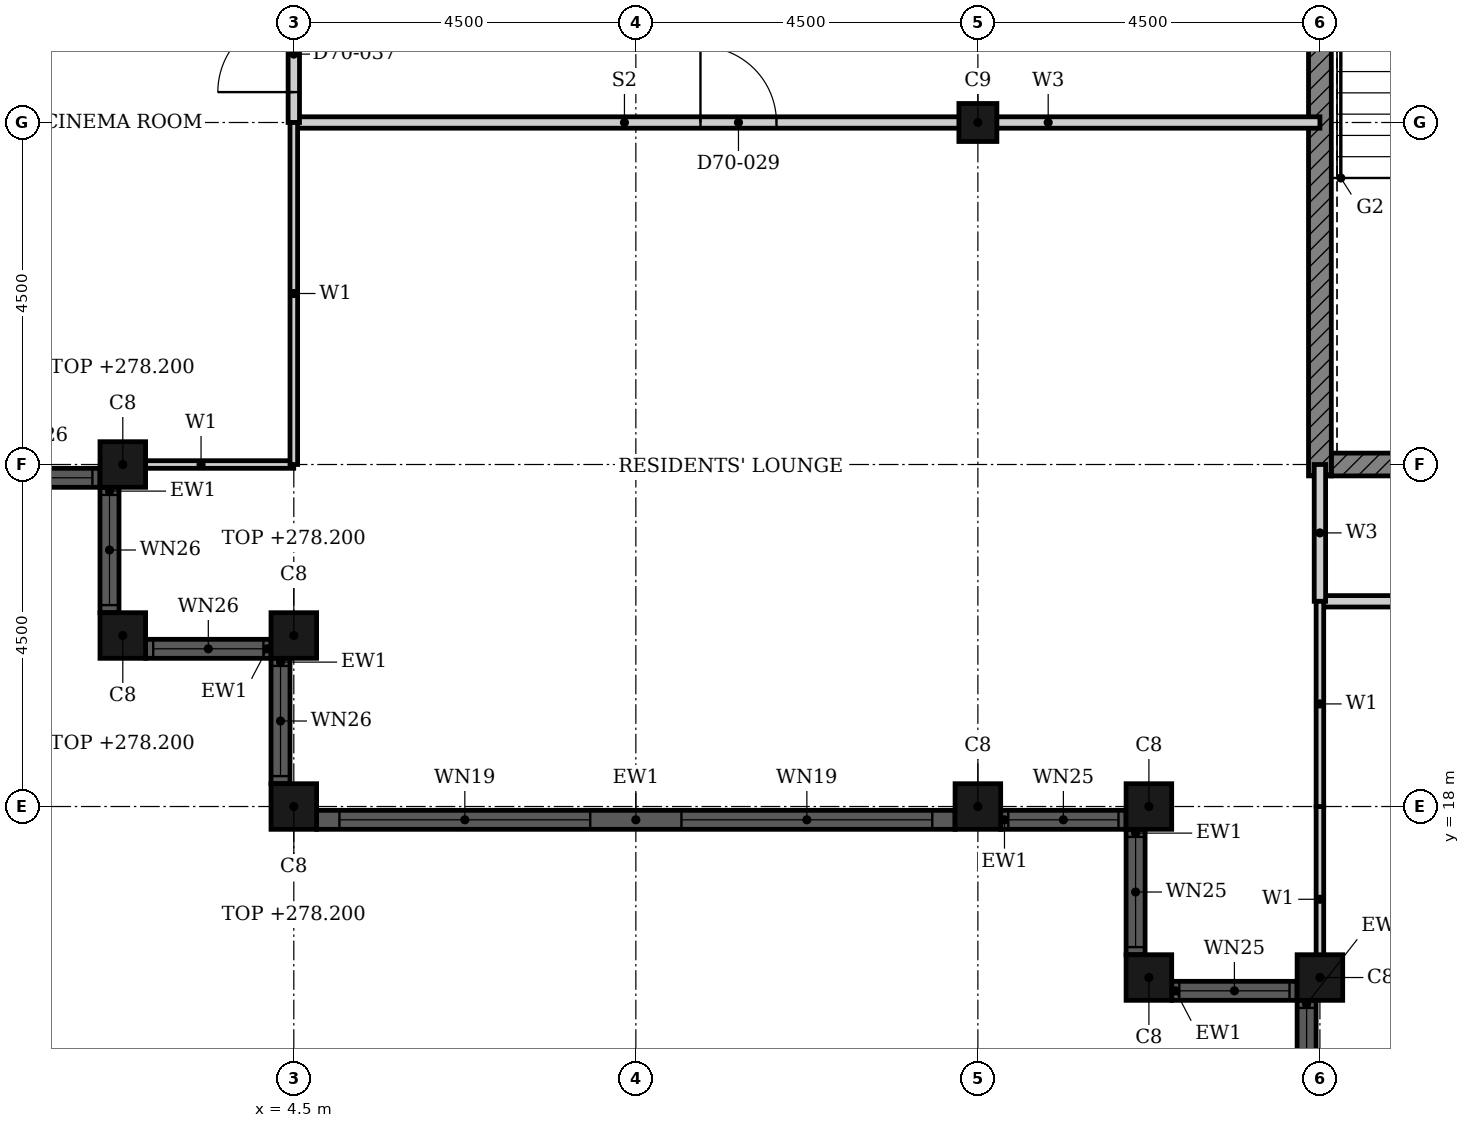
"""IFC4 building model, lengths in metres.
Left out: names, types, materials, properties, quantities, classifications, styles, units other than length and angle.
Written with IfcOpenShell. Run it as: python <this file> out.ifc"""

import sys

from ifc_helpers import new_model, si_unit, direction, frame, frame_2d, origin, origin_2d, place, context, subcontext, project, spatial, rectangle, hollow_rectangle, extrude, element, fill, save


model = new_model("IFC4")
c1 = context("Model", 3, precision=1e-05, world=origin(), true_north=direction((0.0, 1.0)))
c2 = subcontext(c1, "Body", "Model", "MODEL_VIEW")
j1 = project(units=[si_unit("LENGTHUNIT", "METRE"), si_unit("PLANEANGLEUNIT", "RADIAN")], contexts=[c1])
p1 = place(None, origin())
s1 = spatial("IfcSite", under=j1, at=p1, CompositionType="ELEMENT")
p2 = place(p1, origin())
s2 = spatial("IfcBuilding", under=s1, at=p2, CompositionType="ELEMENT")
p3 = place(p2, frame((0.0, 0.0, 274.9)))
s3 = spatial("IfcBuildingStorey", under=s2, at=p3, CompositionType="ELEMENT", Elevation=274.9)
for number, where, z_axis, x_axis in (
    (1, (15.75, 18.0, 0.0), (0.0, 0.0, 1.0), (1.0, 0.0, 0.0)),
    (2, (15.75, 15.75, 0.0), (0.0, 0.0, 1.0), (1.0, 0.0, 0.0)),
    (3, (18.0, 15.75, 0.0), (0.0, 0.0, 1.0), (1.0, 0.0, 0.0)),
):
    element("IfcColumn", number, at=place(p3, frame(where, z_axis=z_axis, x_axis=x_axis)), inside=s3, PredefinedType="COLUMN", context=c2, shape_type="SweptSolid", body=[
        extrude(hollow_rectangle(XDim=0.6, YDim=0.6, WallThickness=0.02, at=origin_2d()), origin(), (0.0, 0.0, 1.0), 3.7),
    ])
for number, where, z_axis, x_axis in (
    (4, (2.25, 22.5, 0.0), (0.0, 0.0, 1.0), (1.0, 0.0, 0.0)),
    (5, (2.25, 20.25, 0.0), (0.0, 0.0, 1.0), (1.0, 0.0, 0.0)),
    (6, (4.5, 20.25, 0.0), (0.0, 0.0, 1.0), (1.0, 0.0, 0.0)),
    (7, (4.5, 18.0, 0.0), (0.0, 0.0, 1.0), (1.0, 0.0, 0.0)),
):
    element("IfcColumn", number, at=place(p3, frame(where, z_axis=z_axis, x_axis=x_axis)), inside=s3, PredefinedType="COLUMN", context=c2, shape_type="SweptSolid", body=[
        extrude(hollow_rectangle(XDim=0.6, YDim=0.6, WallThickness=0.02, at=origin_2d()), origin(), (0.0, 0.0, 1.0), 3.3),
    ])
p4 = place(p3, frame((13.5, 18.0, 0.0), z_axis=(0.0, 0.0, 1.0), x_axis=(1.0, 0.0, 0.0)))
e8 = element("IfcColumn", 8, at=p4, inside=s3, PredefinedType="COLUMN", context=c2, shape_type="SweptSolid", body=[
    extrude(hollow_rectangle(XDim=0.6, YDim=0.6, WallThickness=0.02, at=origin_2d()), origin(), (0.0, 0.0, 1.0), 3.7),
])
p5 = place(p3, frame((13.5, 27.0, 0.0), z_axis=(0.0, 0.0, 1.0), x_axis=(1.0, 0.0, 0.0)))
e9 = element("IfcColumn", 9, at=p5, inside=s3, PredefinedType="COLUMN", context=c2, shape_type="SweptSolid", body=[
    extrude(hollow_rectangle(XDim=0.5, YDim=0.5, WallThickness=0.016, InnerFilletRadius=0.032, OuterFilletRadius=0.048, at=origin_2d()), origin(), (0.0, 0.0, 1.0), 3.7),
])
p6 = place(p3, frame((15.575, 17.7, 0.0), z_axis=(0.0, 0.0, 1.0), x_axis=(0.0, -1.0, 0.0)))
e10 = element("IfcWall", 10, at=p6, inside=s3, PredefinedType="SOLIDWALL", context=c2, shape_type="SweptSolid", body=[
    extrude(rectangle(XDim=1.65, YDim=0.25, at=frame_2d((0.825, 0.0))), origin(), (0.0, 0.0, 1.0), 3.7),
])
p7 = place(p6, frame((0.1, 0.0, 0.9)))
e11 = element("IfcOpeningElement", 11, at=p7, cuts=e10, PredefinedType="OPENING", context=c2, shape_type="SweptSolid", body=[
    extrude(rectangle(XDim=1.45, YDim=1.85, at=frame_2d((0.725, 0.925))), frame((0.0, 0.135, 0.0), z_axis=(0.0, -1.0, 0.0), x_axis=(1.0, 0.0, 0.0)), (0.0, 0.0, 1.0), 0.27),
])
p8 = place(p3, frame((16.05, 15.575, 0.0), z_axis=(0.0, 0.0, 1.0), x_axis=(1.0, 0.0, 0.0)))
e12 = element("IfcWall", 12, at=p8, inside=s3, PredefinedType="SOLIDWALL", context=c2, shape_type="SweptSolid", body=[
    extrude(rectangle(XDim=1.65, YDim=0.25, at=frame_2d((0.825, 0.0))), origin(), (0.0, 0.0, 1.0), 3.7),
])
p9 = place(p8, frame((0.1, 0.0, 0.9)))
e13 = element("IfcOpeningElement", 13, at=p9, cuts=e12, PredefinedType="OPENING", context=c2, shape_type="SweptSolid", body=[
    extrude(rectangle(XDim=1.45, YDim=1.85, at=frame_2d((0.725, 0.925))), frame((0.0, 0.135, 0.0), z_axis=(0.0, -1.0, 0.0), x_axis=(1.0, 0.0, 0.0)), (0.0, 0.0, 1.0), 0.27),
])
p10 = place(p3, frame((17.825, 15.45, 0.0), z_axis=(0.0, 0.0, 1.0), x_axis=(0.0, -1.0, 0.0)))
e14 = element("IfcWall", 14, at=p10, inside=s3, PredefinedType="SOLIDWALL", context=c2, shape_type="SweptSolid", body=[
    extrude(rectangle(XDim=1.65, YDim=0.25, at=frame_2d((0.825, 0.0))), origin(), (0.0, 0.0, 1.0), 3.7),
])
p11 = place(p10, frame((0.1, 0.0, 0.9)))
e15 = element("IfcOpeningElement", 15, at=p11, cuts=e14, PredefinedType="OPENING", context=c2, shape_type="SweptSolid", body=[
    extrude(rectangle(XDim=1.45, YDim=1.85, at=frame_2d((0.725, 0.925))), frame((0.0, 0.135, 0.0), z_axis=(0.0, -1.0, 0.0), x_axis=(1.0, 0.0, 0.0)), (0.0, 0.0, 1.0), 0.27),
])
p12 = place(p3, frame((0.3, 22.325, 0.0), z_axis=(0.0, 0.0, 1.0), x_axis=(1.0, 0.0, 0.0)))
e16 = element("IfcWall", 16, at=p12, inside=s3, PredefinedType="SOLIDWALL", context=c2, shape_type="SweptSolid", body=[
    extrude(rectangle(XDim=1.65, YDim=0.25, at=frame_2d((0.825, 0.0))), origin(), (0.0, 0.0, 1.0), 3.7),
])
p13 = place(p12, frame((0.1, 0.0, 0.9)))
e17 = element("IfcOpeningElement", 17, at=p13, cuts=e16, PredefinedType="OPENING", context=c2, shape_type="SweptSolid", body=[
    extrude(rectangle(XDim=1.45, YDim=1.75, at=frame_2d((0.725, 0.875))), frame((0.0, 0.135, 0.0), z_axis=(0.0, -1.0, 0.0), x_axis=(1.0, 0.0, 0.0)), (0.0, 0.0, 1.0), 0.27),
])
p14 = place(p3, frame((2.075, 22.2, 0.0), z_axis=(0.0, 0.0, 1.0), x_axis=(0.0, -1.0, 0.0)))
e18 = element("IfcWall", 18, at=p14, inside=s3, PredefinedType="SOLIDWALL", context=c2, shape_type="SweptSolid", body=[
    extrude(rectangle(XDim=1.65, YDim=0.25, at=frame_2d((0.825, 0.0))), origin(), (0.0, 0.0, 1.0), 3.7),
])
p15 = place(p14, frame((0.1, 0.0, 0.9)))
e19 = element("IfcOpeningElement", 19, at=p15, cuts=e18, PredefinedType="OPENING", context=c2, shape_type="SweptSolid", body=[
    extrude(rectangle(XDim=1.45, YDim=1.75, at=frame_2d((0.725, 0.875))), frame((0.0, 0.135, 0.0), z_axis=(0.0, -1.0, 0.0), x_axis=(1.0, 0.0, 0.0)), (0.0, 0.0, 1.0), 0.27),
])
p16 = place(p3, frame((2.55, 20.075, 0.0), z_axis=(0.0, 0.0, 1.0), x_axis=(1.0, 0.0, 0.0)))
e20 = element("IfcWall", 20, at=p16, inside=s3, PredefinedType="SOLIDWALL", context=c2, shape_type="SweptSolid", body=[
    extrude(rectangle(XDim=1.65, YDim=0.25, at=frame_2d((0.825, 0.0))), origin(), (0.0, 0.0, 1.0), 3.7),
])
p17 = place(p16, frame((0.1, 0.0, 0.9)))
e21 = element("IfcOpeningElement", 21, at=p17, cuts=e20, PredefinedType="OPENING", context=c2, shape_type="SweptSolid", body=[
    extrude(rectangle(XDim=1.45, YDim=1.75, at=frame_2d((0.725, 0.875))), frame((0.0, 0.135, 0.0), z_axis=(0.0, -1.0, 0.0), x_axis=(1.0, 0.0, 0.0)), (0.0, 0.0, 1.0), 0.27),
])
p18 = place(p3, frame((4.325, 19.95, 0.0), z_axis=(0.0, 0.0, 1.0), x_axis=(0.0, -1.0, 0.0)))
e22 = element("IfcWall", 22, at=p18, inside=s3, PredefinedType="SOLIDWALL", context=c2, shape_type="SweptSolid", body=[
    extrude(rectangle(XDim=1.65, YDim=0.25, at=frame_2d((0.825, 0.0))), origin(), (0.0, 0.0, 1.0), 3.7),
])
p19 = place(p18, frame((0.1, 0.0, 0.9)))
e23 = element("IfcOpeningElement", 23, at=p19, cuts=e22, PredefinedType="OPENING", context=c2, shape_type="SweptSolid", body=[
    extrude(rectangle(XDim=1.45, YDim=1.75, at=frame_2d((0.725, 0.875))), frame((0.0, 0.135, 0.0), z_axis=(0.0, -1.0, 0.0), x_axis=(1.0, 0.0, 0.0)), (0.0, 0.0, 1.0), 0.27),
])
p20 = place(p3, frame((4.8, 17.825, 0.0), z_axis=(0.0, 0.0, 1.0), x_axis=(1.0, 0.0, 0.0)))
e24 = element("IfcWall", 24, at=p20, inside=s3, PredefinedType="SOLIDWALL", context=c2, shape_type="SweptSolid", body=[
    extrude(rectangle(XDim=8.4, YDim=0.25, at=frame_2d((4.2, 0.0))), origin(), (0.0, 0.0, 1.0), 3.7),
])
p21 = place(p20, frame((0.3, 0.0, 0.45)))
e25 = element("IfcOpeningElement", 25, at=p21, cuts=e24, PredefinedType="OPENING", context=c2, shape_type="SweptSolid", body=[
    extrude(rectangle(XDim=3.3, YDim=2.2, at=frame_2d((1.65, 1.1))), frame((0.0, 0.135, 0.0), z_axis=(0.0, -1.0, 0.0), x_axis=(1.0, 0.0, 0.0)), (0.0, 0.0, 1.0), 0.27),
])
p22 = place(p20, frame((4.8, 0.0, 0.45)))
e26 = element("IfcOpeningElement", 26, at=p22, cuts=e24, PredefinedType="OPENING", context=c2, shape_type="SweptSolid", body=[
    extrude(rectangle(XDim=3.3, YDim=2.2, at=frame_2d((1.65, 1.1))), frame((0.0, 0.135, 0.0), z_axis=(0.0, -1.0, 0.0), x_axis=(1.0, 0.0, 0.0)), (0.0, 0.0, 1.0), 0.27),
])
p23 = place(p3, frame((13.8, 17.825, 0.0), z_axis=(0.0, 0.0, 1.0), x_axis=(1.0, 0.0, 0.0)))
e27 = element("IfcWall", 27, at=p23, inside=s3, PredefinedType="SOLIDWALL", context=c2, shape_type="SweptSolid", body=[
    extrude(rectangle(XDim=1.65, YDim=0.25, at=frame_2d((0.825, 0.0))), origin(), (0.0, 0.0, 1.0), 3.7),
])
p24 = place(p23, frame((0.1, 0.0, 0.9)))
e28 = element("IfcOpeningElement", 28, at=p24, cuts=e27, PredefinedType="OPENING", context=c2, shape_type="SweptSolid", body=[
    extrude(rectangle(XDim=1.45, YDim=1.85, at=frame_2d((0.725, 0.925))), frame((0.0, 0.135, 0.0), z_axis=(0.0, -1.0, 0.0), x_axis=(1.0, 0.0, 0.0)), (0.0, 0.0, 1.0), 0.27),
])
p25 = place(p3, frame((18.15, 22.5, 0.0), z_axis=(0.0, 0.0, 1.0), x_axis=(1.0, 0.0, 0.0)))
e29 = element("IfcWall", 29, at=p25, inside=s3, PredefinedType="SHEAR", context=c2, shape_type="SweptSolid", body=[
    extrude(rectangle(XDim=4.225, YDim=0.3, at=frame_2d((2.113, 0.0))), origin(), (0.0, 0.0, 1.0), 3.3),
])
p26 = place(p3, frame((18.0, 22.35, 0.0), z_axis=(0.0, 0.0, 1.0), x_axis=(0.0, 1.0, 0.0)))
e30 = element("IfcWall", 30, at=p26, inside=s3, PredefinedType="SHEAR", context=c2, shape_type="SweptSolid", body=[
    extrude(rectangle(XDim=9.3, YDim=0.3, at=frame_2d((4.65, 0.0))), origin(), (0.0, 0.0, 1.0), 3.3),
])
p27 = place(p3, frame((18.0, 20.7, 0.0), z_axis=(0.0, 0.0, 1.0), x_axis=(1.0, 0.0, 0.0)))
e31 = element("IfcWall", 31, at=p27, inside=s3, PredefinedType="PARTITIONING", context=c2, shape_type="SweptSolid", body=[
    extrude(rectangle(XDim=13.5, YDim=0.15, at=frame_2d((6.75, 0.0))), origin(), (0.0, 0.0, 1.0), 3.3),
])
p28 = place(p27, frame((6.25, 0.0, 0.0)))
e32 = element("IfcOpeningElement", 32, at=p28, cuts=e31, PredefinedType="OPENING", context=c2, shape_type="SweptSolid", body=[
    extrude(rectangle(XDim=1.0, YDim=2.1, at=frame_2d((0.5, 1.05))), frame((0.0, 0.085, 0.0), z_axis=(0.0, -1.0, 0.0), x_axis=(1.0, 0.0, 0.0)), (0.0, 0.0, 1.0), 0.17),
])
p29 = place(p3, frame((4.5, 27.0, 0.0), z_axis=(0.0, 0.0, 1.0), x_axis=(1.0, 0.0, 0.0)))
e33 = element("IfcWall", 33, at=p29, inside=s3, PredefinedType="PARTITIONING", context=c2, shape_type="SweptSolid", body=[
    extrude(rectangle(XDim=13.5, YDim=0.15, at=frame_2d((6.75, 0.0))), origin(), (0.0, 0.0, 1.0), 2.58),
])
p30 = place(p29, frame((5.35, 0.0, 0.0)))
e34 = element("IfcOpeningElement", 34, at=p30, cuts=e33, PredefinedType="OPENING", context=c2, shape_type="SweptSolid", body=[
    extrude(rectangle(XDim=1.0, YDim=2.1, at=frame_2d((0.5, 1.05))), frame((0.0, 0.085, 0.0), z_axis=(0.0, -1.0, 0.0), x_axis=(1.0, 0.0, 0.0)), (0.0, 0.0, 1.0), 0.17),
])
p31 = place(p3, frame((18.0, 20.7, 0.0), z_axis=(0.0, 0.0, 1.0), x_axis=(0.0, 1.0, 0.0)))
e35 = element("IfcWall", 35, at=p31, inside=s3, PredefinedType="PARTITIONING", context=c2, shape_type="SweptSolid", body=[
    extrude(rectangle(XDim=1.8, YDim=0.15, at=frame_2d((0.9, 0.0))), origin(), (0.0, 0.0, 1.0), 3.3),
])
p32 = place(p3, frame((4.5, 27.0, 0.0), z_axis=(0.0, 0.0, 1.0), x_axis=(0.0, 1.0, 0.0)))
e36 = element("IfcWall", 36, at=p32, inside=s3, PredefinedType="PARTITIONING", context=c2, shape_type="SweptSolid", body=[
    extrude(rectangle(XDim=1.8, YDim=0.15, at=frame_2d((0.9, 0.0))), origin(), (0.0, 0.0, 1.0), 3.3),
])
p33 = place(p32, frame((0.4, 0.0, 0.0)))
e37 = element("IfcOpeningElement", 37, at=p33, cuts=e36, PredefinedType="OPENING", context=c2, shape_type="SweptSolid", body=[
    extrude(rectangle(XDim=1.0, YDim=2.1, at=frame_2d((0.5, 1.05))), frame((0.0, 0.085, 0.0), z_axis=(0.0, -1.0, 0.0), x_axis=(1.0, 0.0, 0.0)), (0.0, 0.0, 1.0), 0.17),
])
p34 = place(p3, frame((2.06, 22.5, 0.0), z_axis=(0.0, 0.0, 1.0), x_axis=(1.0, 0.0, 0.0)))
e38 = element("IfcWall", 38, at=p34, inside=s3, PredefinedType="PARTITIONING", context=c2, shape_type="SweptSolid", body=[
    extrude(rectangle(XDim=2.439, YDim=0.1, at=frame_2d((1.219, 0.0))), origin(), (0.0, 0.0, 1.0), 2.58),
])
p35 = place(p3, frame((18.0, 15.56, 0.0), z_axis=(0.0, 0.0, 1.0), x_axis=(0.0, 1.0, 0.0)))
e39 = element("IfcWall", 39, at=p35, inside=s3, PredefinedType="PARTITIONING", context=c2, shape_type="SweptSolid", body=[
    extrude(rectangle(XDim=2.439, YDim=0.1, at=frame_2d((1.219, 0.0))), origin(), (0.0, 0.0, 1.0), 3.3),
])
p36 = place(p3, frame((18.0, 18.0, 0.0), z_axis=(0.0, 0.0, 1.0), x_axis=(0.0, 1.0, 0.0)))
e40 = element("IfcWall", 40, at=p36, inside=s3, PredefinedType="PARTITIONING", context=c2, shape_type="SweptSolid", body=[
    extrude(rectangle(XDim=2.7, YDim=0.1, at=frame_2d((1.35, 0.0))), origin(), (0.0, 0.0, 1.0), 3.3),
])
p37 = place(p3, frame((4.5, 22.5, 0.0), z_axis=(0.0, 0.0, 1.0), x_axis=(0.0, 1.0, 0.0)))
e41 = element("IfcWall", 41, at=p37, inside=s3, PredefinedType="PARTITIONING", context=c2, shape_type="SweptSolid", body=[
    extrude(rectangle(XDim=4.5, YDim=0.1, at=frame_2d((2.25, 0.0))), origin(), (0.0, 0.0, 1.0), 3.3),
])
p38 = place(p7, origin())
e42 = element("IfcWindow", 42, at=p38, inside=s3, PartitioningType="SINGLE_PANEL", PredefinedType="WINDOW", context=c2, shape_type="SweptSolid", body=[
    extrude(rectangle(XDim=1.45, YDim=1.85, at=frame_2d((0.725, 0.925))), frame((0.0, 0.03, 0.0), z_axis=(0.0, -1.0, 0.0), x_axis=(1.0, 0.0, 0.0)), (0.0, 0.0, 1.0), 0.06),
])
fill(e11, e42)
p39 = place(p9, origin())
e43 = element("IfcWindow", 43, at=p39, inside=s3, PartitioningType="SINGLE_PANEL", PredefinedType="WINDOW", context=c2, shape_type="SweptSolid", body=[
    extrude(rectangle(XDim=1.45, YDim=1.85, at=frame_2d((0.725, 0.925))), frame((0.0, 0.03, 0.0), z_axis=(0.0, -1.0, 0.0), x_axis=(1.0, 0.0, 0.0)), (0.0, 0.0, 1.0), 0.06),
])
fill(e13, e43)
p40 = place(p11, origin())
e44 = element("IfcWindow", 44, at=p40, inside=s3, PartitioningType="SINGLE_PANEL", PredefinedType="WINDOW", context=c2, shape_type="SweptSolid", body=[
    extrude(rectangle(XDim=1.45, YDim=1.85, at=frame_2d((0.725, 0.925))), frame((0.0, 0.03, 0.0), z_axis=(0.0, -1.0, 0.0), x_axis=(1.0, 0.0, 0.0)), (0.0, 0.0, 1.0), 0.06),
])
fill(e15, e44)
p41 = place(p13, origin())
e45 = element("IfcWindow", 45, at=p41, inside=s3, PartitioningType="SINGLE_PANEL", PredefinedType="WINDOW", context=c2, shape_type="SweptSolid", body=[
    extrude(rectangle(XDim=1.45, YDim=1.75, at=frame_2d((0.725, 0.875))), frame((0.0, 0.03, 0.0), z_axis=(0.0, -1.0, 0.0), x_axis=(1.0, 0.0, 0.0)), (0.0, 0.0, 1.0), 0.06),
])
fill(e17, e45)
p42 = place(p15, origin())
e46 = element("IfcWindow", 46, at=p42, inside=s3, PartitioningType="SINGLE_PANEL", PredefinedType="WINDOW", context=c2, shape_type="SweptSolid", body=[
    extrude(rectangle(XDim=1.45, YDim=1.75, at=frame_2d((0.725, 0.875))), frame((0.0, 0.03, 0.0), z_axis=(0.0, -1.0, 0.0), x_axis=(1.0, 0.0, 0.0)), (0.0, 0.0, 1.0), 0.06),
])
fill(e19, e46)
p43 = place(p17, origin())
e47 = element("IfcWindow", 47, at=p43, inside=s3, PartitioningType="SINGLE_PANEL", PredefinedType="WINDOW", context=c2, shape_type="SweptSolid", body=[
    extrude(rectangle(XDim=1.45, YDim=1.75, at=frame_2d((0.725, 0.875))), frame((0.0, 0.03, 0.0), z_axis=(0.0, -1.0, 0.0), x_axis=(1.0, 0.0, 0.0)), (0.0, 0.0, 1.0), 0.06),
])
fill(e21, e47)
p44 = place(p19, origin())
e48 = element("IfcWindow", 48, at=p44, inside=s3, PartitioningType="SINGLE_PANEL", PredefinedType="WINDOW", context=c2, shape_type="SweptSolid", body=[
    extrude(rectangle(XDim=1.45, YDim=1.75, at=frame_2d((0.725, 0.875))), frame((0.0, 0.03, 0.0), z_axis=(0.0, -1.0, 0.0), x_axis=(1.0, 0.0, 0.0)), (0.0, 0.0, 1.0), 0.06),
])
fill(e23, e48)
p45 = place(p21, origin())
e49 = element("IfcWindow", 49, at=p45, inside=s3, PartitioningType="SINGLE_PANEL", PredefinedType="WINDOW", context=c2, shape_type="SweptSolid", body=[
    extrude(rectangle(XDim=3.3, YDim=2.2, at=frame_2d((1.65, 1.1))), frame((0.0, 0.03, 0.0), z_axis=(0.0, -1.0, 0.0), x_axis=(1.0, 0.0, 0.0)), (0.0, 0.0, 1.0), 0.06),
])
fill(e25, e49)
p46 = place(p22, origin())
e50 = element("IfcWindow", 50, at=p46, inside=s3, PartitioningType="SINGLE_PANEL", PredefinedType="WINDOW", context=c2, shape_type="SweptSolid", body=[
    extrude(rectangle(XDim=3.3, YDim=2.2, at=frame_2d((1.65, 1.1))), frame((0.0, 0.03, 0.0), z_axis=(0.0, -1.0, 0.0), x_axis=(1.0, 0.0, 0.0)), (0.0, 0.0, 1.0), 0.06),
])
fill(e26, e50)
p47 = place(p24, origin())
e51 = element("IfcWindow", 51, at=p47, inside=s3, PartitioningType="SINGLE_PANEL", PredefinedType="WINDOW", context=c2, shape_type="SweptSolid", body=[
    extrude(rectangle(XDim=1.45, YDim=1.85, at=frame_2d((0.725, 0.925))), frame((0.0, 0.03, 0.0), z_axis=(0.0, -1.0, 0.0), x_axis=(1.0, 0.0, 0.0)), (0.0, 0.0, 1.0), 0.06),
])
fill(e28, e51)
p48 = place(p30, origin())
e52 = element("IfcDoor", 52, at=p48, inside=s3, OperationType="SINGLE_SWING_LEFT", PredefinedType="DOOR", context=c2, shape_type="SweptSolid", body=[
    extrude(rectangle(XDim=1.0, YDim=2.1, at=frame_2d((0.5, 1.05))), frame((0.0, 0.025, 0.0), z_axis=(0.0, -1.0, 0.0), x_axis=(1.0, 0.0, 0.0)), (0.0, 0.0, 1.0), 0.05),
])
fill(e34, e52)
p49 = place(p33, origin())
e53 = element("IfcDoor", 53, at=p49, inside=s3, OperationType="SINGLE_SWING_RIGHT", PredefinedType="DOOR", context=c2, shape_type="SweptSolid", body=[
    extrude(rectangle(XDim=1.0, YDim=2.1, at=frame_2d((0.5, 1.05))), frame((0.0, 0.025, 0.0), z_axis=(0.0, -1.0, 0.0), x_axis=(1.0, 0.0, 0.0)), (0.0, 0.0, 1.0), 0.05),
])
fill(e37, e53)
save(model, sys.argv[1])
